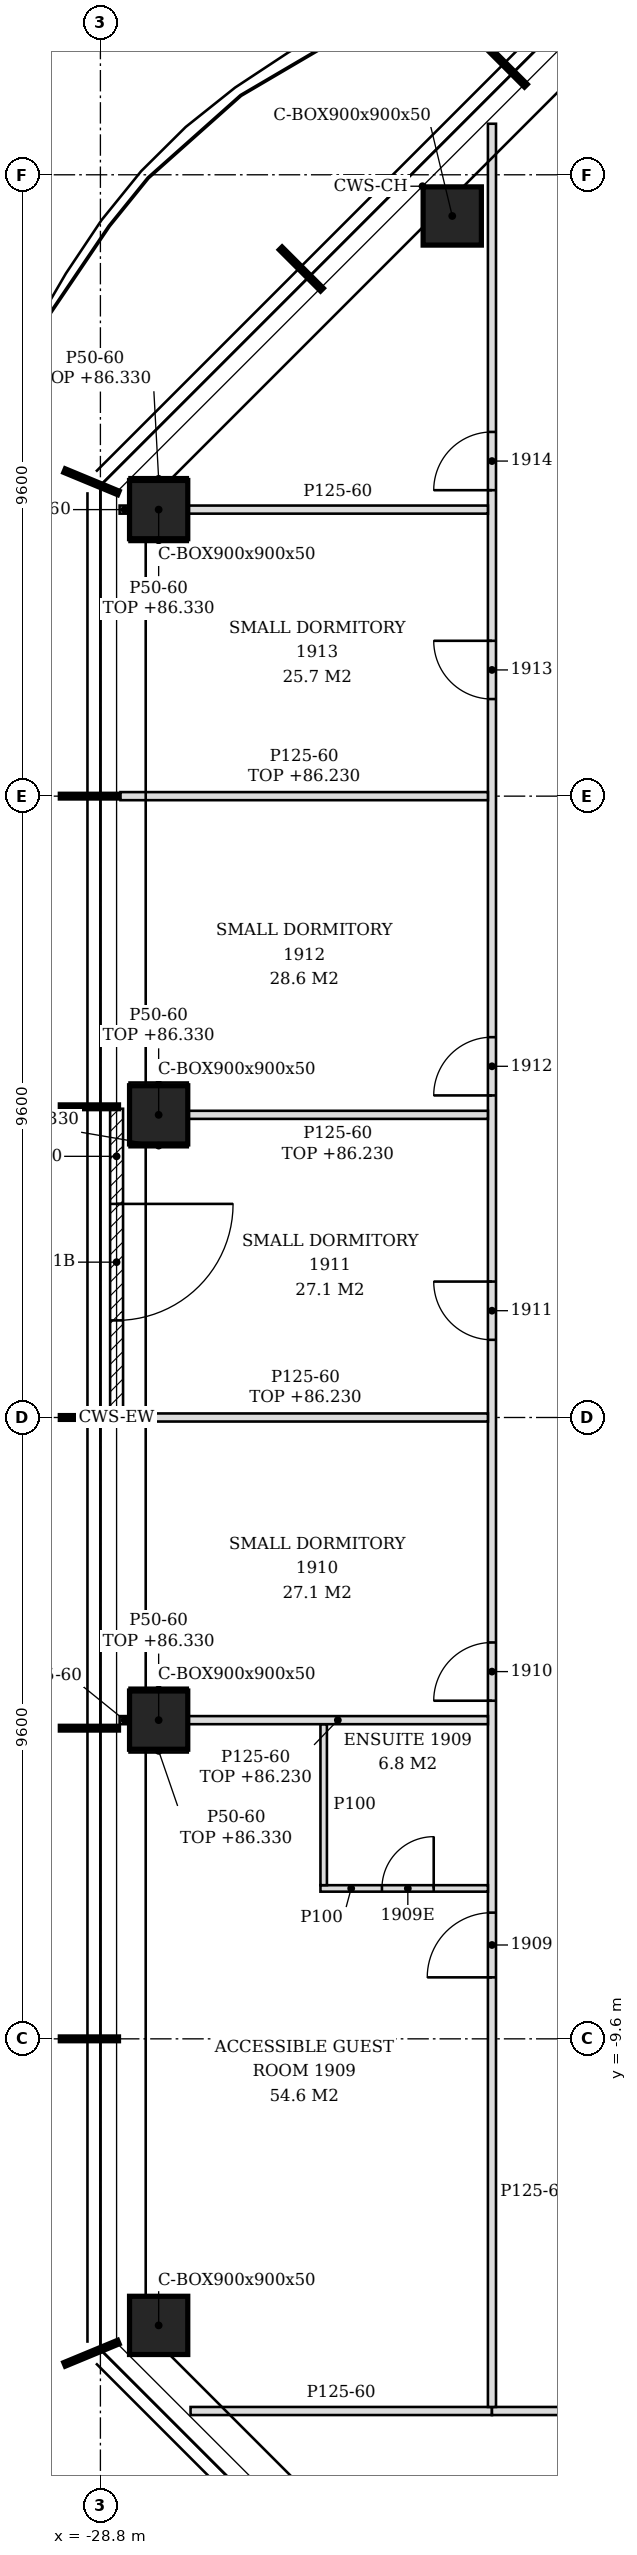
"""IFC4 building model, lengths in metres.
Left out: names, types, materials, properties, quantities, classifications, styles, units other than length and angle.
Written with IfcOpenShell. Run it as: python <this file> out.ifc"""

import sys

from ifc_helpers import new_model, si_unit, direction, frame, frame_2d, origin, origin_2d, place, context, subcontext, project, spatial, polyline, rectangle, hollow_rectangle, outline, extrude, clip, halfspace, element, fill, save


model = new_model("IFC4")
c1 = context("Model", 3, precision=1e-05, world=origin(), true_north=direction((0.0, 1.0)))
c2 = subcontext(c1, "Body", "Model", "MODEL_VIEW")
j1 = project(units=[si_unit("LENGTHUNIT", "METRE"), si_unit("PLANEANGLEUNIT", "RADIAN")], contexts=[c1])
p1 = place(None, origin())
s1 = spatial("IfcSite", under=j1, at=p1, CompositionType="ELEMENT")
p2 = place(p1, origin())
s2 = spatial("IfcBuilding", under=s1, at=p2, CompositionType="ELEMENT")
p3 = place(p2, frame((0.0, 0.0, 83.4)))
s3 = spatial("IfcBuildingStorey", under=s2, at=p3, CompositionType="ELEMENT", Elevation=83.4)
for number, where, z_axis, x_axis in (
    (1, (-23.364, 18.564, -0.15), (0.0, 0.0, 1.0), (1.0, 0.0, 0.0)),
    (2, (-27.9, 14.027, -0.15), (0.0, 0.0, 1.0), (1.0, 0.0, 0.0)),
    (3, (-27.9, 4.676, -0.15), (0.0, 0.0, 1.0), (1.0, 0.0, 0.0)),
    (4, (-27.9, -4.676, -0.15), (0.0, 0.0, 1.0), (1.0, 0.0, 0.0)),
    (5, (-27.9, -14.027, -0.15), (0.0, 0.0, 1.0), (1.0, 0.0, 0.0)),
):
    element("IfcColumn", number, at=place(p3, frame(where, z_axis=z_axis, x_axis=x_axis)), inside=s3, PredefinedType="COLUMN", context=c2, shape_type="Clipping", body=[
        clip(extrude(hollow_rectangle(XDim=0.9, YDim=0.9, WallThickness=0.05, at=origin_2d()), origin(), (0.0, 0.0, 1.0), 3.6), halfspace(frame((0.0, 0.0, 3.576), z_axis=(0.0, 0.0, 1.0), x_axis=(1.0, 0.0, 0.0)), False)),
    ])
p4 = place(p3, frame((-28.55, 4.77, 0.0), z_axis=(0.0, 0.0, 1.0), x_axis=(0.0, -1.0, 0.0)))
e6 = element("IfcWall", 6, at=p4, inside=s3, PredefinedType="NOTDEFINED", context=c2, shape_type="SweptSolid", body=[
    extrude(rectangle(XDim=4.74, YDim=0.2, at=frame_2d((2.37, 0.0))), origin(), (0.0, 0.0, 1.0), 3.45),
])
p5 = place(p4, frame((1.47, 0.0, 0.0)))
e7 = element("IfcOpeningElement", 7, at=p5, cuts=e6, PredefinedType="OPENING", context=c2, shape_type="SweptSolid", body=[
    extrude(rectangle(XDim=1.8, YDim=2.4, at=frame_2d((0.9, 1.2))), frame((0.0, 0.11, 0.0), z_axis=(0.0, -1.0, 0.0), x_axis=(1.0, 0.0, 0.0)), (0.0, 0.0, 1.0), 0.22),
])
p6 = place(p3, frame((-27.407, -15.35, 0.0), z_axis=(0.0, 0.0, 1.0), x_axis=(1.0, 0.0, 0.0)))
e8 = element("IfcWall", 8, at=p6, inside=s3, PredefinedType="PARTITIONING", context=c2, shape_type="SweptSolid", body=[
    extrude(outline(polyline([(0.0, 0.0), (4.657, 0.0), (4.657, 3.45), (1.104, 3.45), (1.102, 2.93), (0.555, 2.93), (0.553, 3.45), (0.0, 3.45), (0.0, 0.0)])), frame((0.0, 0.062, 0.0), z_axis=(0.0, -1.0, 0.0), x_axis=(1.0, 0.0, 0.0)), (0.0, 0.0, 1.0), 0.125),
])
p7 = place(p3, frame((-22.75, -15.35, 0.0), z_axis=(0.0, 0.0, 1.0), x_axis=(1.0, 0.0, 0.0)))
e9 = element("IfcWall", 9, at=p7, inside=s3, PredefinedType="PARTITIONING", context=c2, shape_type="SweptSolid", body=[
    extrude(outline(polyline([(0.0, 0.0), (41.887, 0.0), (41.887, 2.73), (41.8, 2.73), (41.798, 3.45), (30.1, 3.45), (30.098, 2.73), (29.8, 2.73), (29.798, 3.45), (18.1, 3.45), (18.098, 2.73), (17.8, 2.73), (17.798, 3.45), (8.5, 3.45), (8.498, 2.93), (8.2, 2.93), (8.198, 3.45), (0.0, 3.45), (0.0, 0.0)])), frame((0.0, 0.062, 0.0), z_axis=(0.0, -1.0, 0.0), x_axis=(1.0, 0.0, 0.0)), (0.0, 0.0, 1.0), 0.125),
])
p8 = place(p7, frame((7.15, 0.0, 0.0)))
e10 = element("IfcOpeningElement", 10, at=p8, cuts=e9, PredefinedType="OPENING", context=c2, shape_type="SweptSolid", body=[
    extrude(rectangle(XDim=0.9, YDim=2.1, at=frame_2d((0.45, 1.05))), frame((0.0, 0.073, 0.0), z_axis=(0.0, -1.0, 0.0), x_axis=(1.0, 0.0, 0.0)), (0.0, 0.0, 1.0), 0.145),
])
p9 = place(p7, frame((9.736, 0.0, 0.0)))
e11 = element("IfcOpeningElement", 11, at=p9, cuts=e9, PredefinedType="OPENING", context=c2, shape_type="SweptSolid", body=[
    extrude(rectangle(XDim=0.9, YDim=2.1, at=frame_2d((0.45, 1.05))), frame((0.0, 0.073, 0.0), z_axis=(0.0, -1.0, 0.0), x_axis=(1.0, 0.0, 0.0)), (0.0, 0.0, 1.0), 0.145),
])
p10 = place(p7, frame((16.75, 0.0, 0.0)))
e12 = element("IfcOpeningElement", 12, at=p10, cuts=e9, PredefinedType="OPENING", context=c2, shape_type="SweptSolid", body=[
    extrude(rectangle(XDim=0.9, YDim=2.1, at=frame_2d((0.45, 1.05))), frame((0.0, 0.073, 0.0), z_axis=(0.0, -1.0, 0.0), x_axis=(1.0, 0.0, 0.0)), (0.0, 0.0, 1.0), 0.145),
])
p11 = place(p7, frame((19.15, 0.0, 0.0)))
e13 = element("IfcOpeningElement", 13, at=p11, cuts=e9, PredefinedType="OPENING", context=c2, shape_type="SweptSolid", body=[
    extrude(rectangle(XDim=0.9, YDim=2.1, at=frame_2d((0.45, 1.05))), frame((0.0, 0.073, 0.0), z_axis=(0.0, -1.0, 0.0), x_axis=(1.0, 0.0, 0.0)), (0.0, 0.0, 1.0), 0.145),
])
p12 = place(p7, frame((23.95, 0.0, 0.0)))
e14 = element("IfcOpeningElement", 14, at=p12, cuts=e9, PredefinedType="OPENING", context=c2, shape_type="SweptSolid", body=[
    extrude(rectangle(XDim=0.9, YDim=2.1, at=frame_2d((0.45, 1.05))), frame((0.0, 0.073, 0.0), z_axis=(0.0, -1.0, 0.0), x_axis=(1.0, 0.0, 0.0)), (0.0, 0.0, 1.0), 0.145),
])
p13 = place(p7, frame((30.964, 0.0, 0.0)))
e15 = element("IfcOpeningElement", 15, at=p13, cuts=e9, PredefinedType="OPENING", context=c2, shape_type="SweptSolid", body=[
    extrude(rectangle(XDim=0.9, YDim=2.1, at=frame_2d((0.45, 1.05))), frame((0.0, 0.073, 0.0), z_axis=(0.0, -1.0, 0.0), x_axis=(1.0, 0.0, 0.0)), (0.0, 0.0, 1.0), 0.145),
])
p14 = place(p7, frame((34.95, 0.0, 0.0)))
e16 = element("IfcOpeningElement", 16, at=p14, cuts=e9, PredefinedType="OPENING", context=c2, shape_type="SweptSolid", body=[
    extrude(rectangle(XDim=0.9, YDim=2.1, at=frame_2d((0.45, 1.05))), frame((0.0, 0.073, 0.0), z_axis=(0.0, -1.0, 0.0), x_axis=(1.0, 0.0, 0.0)), (0.0, 0.0, 1.0), 0.145),
])
p15 = place(p7, frame((39.95, 0.0, 0.0)))
e17 = element("IfcOpeningElement", 17, at=p15, cuts=e9, PredefinedType="OPENING", context=c2, shape_type="SweptSolid", body=[
    extrude(rectangle(XDim=0.9, YDim=2.1, at=frame_2d((0.45, 1.05))), frame((0.0, 0.073, 0.0), z_axis=(0.0, -1.0, 0.0), x_axis=(1.0, 0.0, 0.0)), (0.0, 0.0, 1.0), 0.145),
])
p16 = place(p3, frame((-22.75, -15.288, 0.0), z_axis=(0.0, 0.0, 1.0), x_axis=(0.0, 1.0, 0.0)))
e18 = element("IfcWall", 18, at=p16, inside=s3, PredefinedType="PARTITIONING", context=c2, shape_type="SweptSolid", body=[
    extrude(outline(polyline([(0.0, 0.0), (35.276, 0.0), (35.276, 3.45), (35.022, 3.45), (35.02, 2.63), (33.907, 2.63), (33.905, 3.45), (29.798, 3.45), (29.795, 2.83), (29.577, 2.83), (29.575, 3.45), (24.998, 3.45), (24.996, 2.83), (24.778, 2.83), (24.775, 3.45), (20.198, 3.45), (20.196, 2.83), (19.978, 2.83), (19.976, 3.45), (15.397, 3.45), (15.396, 2.83), (15.177, 2.83), (15.176, 3.45), (10.597, 3.45), (10.595, 2.83), (10.377, 2.83), (10.375, 3.45), (5.798, 3.45), (5.795, 2.83), (5.577, 2.83), (5.575, 3.45), (0.998, 3.45), (0.996, 2.83), (0.778, 2.83), (0.775, 3.45), (0.0, 3.45), (0.0, 0.0)])), frame((0.0, 0.062, 0.0), z_axis=(0.0, -1.0, 0.0), x_axis=(1.0, 0.0, 0.0)), (0.0, 0.0, 1.0), 0.125),
])
p17 = place(p16, frame((6.637, 0.0, 0.0)))
e19 = element("IfcOpeningElement", 19, at=p17, cuts=e18, PredefinedType="OPENING", context=c2, shape_type="SweptSolid", body=[
    extrude(rectangle(XDim=1.0, YDim=2.1, at=frame_2d((0.5, 1.05))), frame((0.0, 0.073, 0.0), z_axis=(0.0, -1.0, 0.0), x_axis=(1.0, 0.0, 0.0)), (0.0, 0.0, 1.0), 0.145),
])
p18 = place(p16, frame((10.912, 0.0, 0.0)))
e20 = element("IfcOpeningElement", 20, at=p18, cuts=e18, PredefinedType="OPENING", context=c2, shape_type="SweptSolid", body=[
    extrude(rectangle(XDim=0.9, YDim=2.1, at=frame_2d((0.45, 1.05))), frame((0.0, 0.073, 0.0), z_axis=(0.0, -1.0, 0.0), x_axis=(1.0, 0.0, 0.0)), (0.0, 0.0, 1.0), 0.145),
])
p19 = place(p16, frame((16.488, 0.0, 0.0)))
e21 = element("IfcOpeningElement", 21, at=p19, cuts=e18, PredefinedType="OPENING", context=c2, shape_type="SweptSolid", body=[
    extrude(rectangle(XDim=0.9, YDim=2.1, at=frame_2d((0.45, 1.05))), frame((0.0, 0.073, 0.0), z_axis=(0.0, -1.0, 0.0), x_axis=(1.0, 0.0, 0.0)), (0.0, 0.0, 1.0), 0.145),
])
p20 = place(p16, frame((20.263, 0.0, 0.0)))
e22 = element("IfcOpeningElement", 22, at=p20, cuts=e18, PredefinedType="OPENING", context=c2, shape_type="SweptSolid", body=[
    extrude(rectangle(XDim=0.9, YDim=2.1, at=frame_2d((0.45, 1.05))), frame((0.0, 0.073, 0.0), z_axis=(0.0, -1.0, 0.0), x_axis=(1.0, 0.0, 0.0)), (0.0, 0.0, 1.0), 0.145),
])
p21 = place(p16, frame((26.387, 0.0, 0.0)))
e23 = element("IfcOpeningElement", 23, at=p21, cuts=e18, PredefinedType="OPENING", context=c2, shape_type="SweptSolid", body=[
    extrude(rectangle(XDim=0.9, YDim=2.1, at=frame_2d((0.45, 1.05))), frame((0.0, 0.073, 0.0), z_axis=(0.0, -1.0, 0.0), x_axis=(1.0, 0.0, 0.0)), (0.0, 0.0, 1.0), 0.145),
])
p22 = place(p16, frame((29.615, 0.0, 0.0)))
e24 = element("IfcOpeningElement", 24, at=p22, cuts=e18, PredefinedType="OPENING", context=c2, shape_type="SweptSolid", body=[
    extrude(rectangle(XDim=0.9, YDim=2.1, at=frame_2d((0.45, 1.05))), frame((0.0, 0.073, 0.0), z_axis=(0.0, -1.0, 0.0), x_axis=(1.0, 0.0, 0.0)), (0.0, 0.0, 1.0), 0.145),
])
p23 = place(p3, frame((-25.4, -7.276, 0.0), z_axis=(0.0, 0.0, 1.0), x_axis=(1.0, 0.0, 0.0)))
e25 = element("IfcWall", 25, at=p23, inside=s3, PredefinedType="PARTITIONING", context=c2, shape_type="SweptSolid", body=[
    extrude(rectangle(XDim=2.587, YDim=0.1, at=frame_2d((1.294, 0.0))), origin(), (0.0, 0.0, 1.0), 3.45),
])
p24 = place(p23, frame((0.95, 0.0, 0.0)))
e26 = element("IfcOpeningElement", 26, at=p24, cuts=e25, PredefinedType="OPENING", context=c2, shape_type="SweptSolid", body=[
    extrude(rectangle(XDim=0.8, YDim=2.1, at=frame_2d((0.4, 1.05))), frame((0.0, 0.06, 0.0), z_axis=(0.0, -1.0, 0.0), x_axis=(1.0, 0.0, 0.0)), (0.0, 0.0, 1.0), 0.12),
])
p25 = place(p3, frame((-25.35, -7.226, 0.0), z_axis=(0.0, 0.0, 1.0), x_axis=(0.0, 1.0, 0.0)))
e27 = element("IfcWall", 27, at=p25, inside=s3, PredefinedType="PARTITIONING", context=c2, shape_type="SweptSolid", body=[
    extrude(outline(polyline([(0.0, 0.0), (2.488, 0.0), (2.488, 2.83), (2.316, 2.83), (2.314, 3.45), (0.0, 3.45), (0.0, 0.0)])), frame((0.0, 0.05, 0.0), z_axis=(0.0, -1.0, 0.0), x_axis=(1.0, 0.0, 0.0)), (0.0, 0.0, 1.0), 0.1),
])
p26 = place(p3, frame((-28.503, -4.676, 0.0), z_axis=(0.0, 0.0, 1.0), x_axis=(1.0, 0.0, 0.0)))
e28 = element("IfcWall", 28, at=p26, inside=s3, PredefinedType="PARTITIONING", context=c2, shape_type="SweptSolid", body=[
    extrude(rectangle(XDim=0.153, YDim=0.125, at=frame_2d((0.076, 0.0))), origin(), (0.0, 0.0, 1.0), 3.45),
])
p27 = place(p3, frame((-27.45, -4.676, 0.0), z_axis=(0.0, 0.0, 1.0), x_axis=(1.0, 0.0, 0.0)))
e29 = element("IfcWall", 29, at=p27, inside=s3, PredefinedType="PARTITIONING", context=c2, shape_type="SweptSolid", body=[
    extrude(rectangle(XDim=4.637, YDim=0.125, at=frame_2d((2.319, 0.0))), origin(), (0.0, 0.0, 1.0), 2.83),
])
p28 = place(p3, frame((-28.45, 0.0, 0.0), z_axis=(0.0, 0.0, 1.0), x_axis=(1.0, 0.0, 0.0)))
e30 = element("IfcWall", 30, at=p28, inside=s3, PredefinedType="PARTITIONING", context=c2, shape_type="SweptSolid", body=[
    extrude(rectangle(XDim=5.637, YDim=0.125, at=frame_2d((2.819, 0.0))), origin(), (0.0, 0.0, 1.0), 2.83),
])
p29 = place(p3, frame((-27.45, 4.676, 0.0), z_axis=(0.0, 0.0, 1.0), x_axis=(1.0, 0.0, 0.0)))
e31 = element("IfcWall", 31, at=p29, inside=s3, PredefinedType="PARTITIONING", context=c2, shape_type="SweptSolid", body=[
    extrude(rectangle(XDim=4.637, YDim=0.125, at=frame_2d((2.319, 0.0))), origin(), (0.0, 0.0, 1.0), 2.83),
])
p30 = place(p3, frame((-28.49, 9.6, 0.0), z_axis=(0.0, 0.0, 1.0), x_axis=(1.0, 0.0, 0.0)))
e32 = element("IfcWall", 32, at=p30, inside=s3, PredefinedType="PARTITIONING", context=c2, shape_type="SweptSolid", body=[
    extrude(rectangle(XDim=5.677, YDim=0.125, at=frame_2d((2.839, 0.0))), origin(), (0.0, 0.0, 1.0), 2.83),
])
p31 = place(p3, frame((-28.503, 14.027, 0.0), z_axis=(0.0, 0.0, 1.0), x_axis=(1.0, 0.0, 0.0)))
e33 = element("IfcWall", 33, at=p31, inside=s3, PredefinedType="PARTITIONING", context=c2, shape_type="SweptSolid", body=[
    extrude(rectangle(XDim=0.153, YDim=0.125, at=frame_2d((0.076, 0.0))), origin(), (0.0, 0.0, 1.0), 3.45),
])
p32 = place(p3, frame((-27.45, 14.027, 0.0), z_axis=(0.0, 0.0, 1.0), x_axis=(1.0, 0.0, 0.0)))
e34 = element("IfcWall", 34, at=p32, inside=s3, PredefinedType="PARTITIONING", context=c2, shape_type="SweptSolid", body=[
    extrude(rectangle(XDim=4.637, YDim=0.125, at=frame_2d((2.319, 0.0))), origin(), (0.0, 0.0, 1.0), 3.45),
])
for number, where, z_axis, x_axis in (
    (35, (-28.35, -4.201, 0.0), (0.0, 0.0, 1.0), (1.0, 0.0, 0.0)),
    (36, (-28.35, -5.151, 0.0), (0.0, 0.0, 1.0), (1.0, 0.0, 0.0)),
    (37, (-28.35, 5.151, 0.0), (0.0, 0.0, 1.0), (1.0, 0.0, 0.0)),
    (38, (-28.35, 4.201, 0.0), (0.0, 0.0, 1.0), (1.0, 0.0, 0.0)),
    (39, (-28.35, 14.502, 0.0), (0.0, 0.0, 1.0), (1.0, 0.0, 0.0)),
    (40, (-28.35, 13.552, 0.0), (0.0, 0.0, 1.0), (1.0, 0.0, 0.0)),
):
    element("IfcWall", number, at=place(p3, frame(where, z_axis=z_axis, x_axis=x_axis)), inside=s3, PredefinedType="PARTITIONING", context=c2, shape_type="SweptSolid", body=[
        extrude(rectangle(XDim=0.9, YDim=0.05, at=frame_2d((0.45, 0.0))), origin(), (0.0, 0.0, 1.0), 2.93),
    ])
p33 = place(p5, origin())
e41 = element("IfcDoor", 41, at=p33, inside=s3, OperationType="SINGLE_SWING_LEFT", PredefinedType="DOOR", context=c2, shape_type="SweptSolid", body=[
    extrude(rectangle(XDim=1.8, YDim=2.4, at=frame_2d((0.9, 1.2))), frame((0.0, 0.025, 0.0), z_axis=(0.0, -1.0, 0.0), x_axis=(1.0, 0.0, 0.0)), (0.0, 0.0, 1.0), 0.05),
])
fill(e7, e41)
p34 = place(p17, origin())
e42 = element("IfcDoor", 42, at=p34, inside=s3, OperationType="SINGLE_SWING_LEFT", PredefinedType="DOOR", context=c2, shape_type="SweptSolid", body=[
    extrude(rectangle(XDim=1.0, YDim=2.1, at=frame_2d((0.5, 1.05))), frame((0.0, 0.025, 0.0), z_axis=(0.0, -1.0, 0.0), x_axis=(1.0, 0.0, 0.0)), (0.0, 0.0, 1.0), 0.05),
])
fill(e19, e42)
p35 = place(p24, origin())
e43 = element("IfcDoor", 43, at=p35, inside=s3, OperationType="SINGLE_SWING_RIGHT", PredefinedType="DOOR", context=c2, shape_type="SweptSolid", body=[
    extrude(rectangle(XDim=0.8, YDim=2.1, at=frame_2d((0.4, 1.05))), frame((0.0, 0.025, 0.0), z_axis=(0.0, -1.0, 0.0), x_axis=(1.0, 0.0, 0.0)), (0.0, 0.0, 1.0), 0.05),
])
fill(e26, e43)
p36 = place(p18, origin())
e44 = element("IfcDoor", 44, at=p36, inside=s3, OperationType="SINGLE_SWING_LEFT", PredefinedType="DOOR", context=c2, shape_type="SweptSolid", body=[
    extrude(rectangle(XDim=0.9, YDim=2.1, at=frame_2d((0.45, 1.05))), frame((0.0, 0.025, 0.0), z_axis=(0.0, -1.0, 0.0), x_axis=(1.0, 0.0, 0.0)), (0.0, 0.0, 1.0), 0.05),
])
fill(e20, e44)
p37 = place(p19, origin())
e45 = element("IfcDoor", 45, at=p37, inside=s3, OperationType="SINGLE_SWING_RIGHT", PredefinedType="DOOR", context=c2, shape_type="SweptSolid", body=[
    extrude(rectangle(XDim=0.9, YDim=2.1, at=frame_2d((0.45, 1.05))), frame((0.0, 0.025, 0.0), z_axis=(0.0, -1.0, 0.0), x_axis=(1.0, 0.0, 0.0)), (0.0, 0.0, 1.0), 0.05),
])
fill(e21, e45)
p38 = place(p20, origin())
e46 = element("IfcDoor", 46, at=p38, inside=s3, OperationType="SINGLE_SWING_LEFT", PredefinedType="DOOR", context=c2, shape_type="SweptSolid", body=[
    extrude(rectangle(XDim=0.9, YDim=2.1, at=frame_2d((0.45, 1.05))), frame((0.0, 0.025, 0.0), z_axis=(0.0, -1.0, 0.0), x_axis=(1.0, 0.0, 0.0)), (0.0, 0.0, 1.0), 0.05),
])
fill(e22, e46)
p39 = place(p21, origin())
e47 = element("IfcDoor", 47, at=p39, inside=s3, OperationType="SINGLE_SWING_RIGHT", PredefinedType="DOOR", context=c2, shape_type="SweptSolid", body=[
    extrude(rectangle(XDim=0.9, YDim=2.1, at=frame_2d((0.45, 1.05))), frame((0.0, 0.025, 0.0), z_axis=(0.0, -1.0, 0.0), x_axis=(1.0, 0.0, 0.0)), (0.0, 0.0, 1.0), 0.05),
])
fill(e23, e47)
p40 = place(p22, origin())
e48 = element("IfcDoor", 48, at=p40, inside=s3, OperationType="SINGLE_SWING_LEFT", PredefinedType="DOOR", context=c2, shape_type="SweptSolid", body=[
    extrude(rectangle(XDim=0.9, YDim=2.1, at=frame_2d((0.45, 1.05))), frame((0.0, 0.025, 0.0), z_axis=(0.0, -1.0, 0.0), x_axis=(1.0, 0.0, 0.0)), (0.0, 0.0, 1.0), 0.05),
])
fill(e24, e48)
save(model, sys.argv[1])
